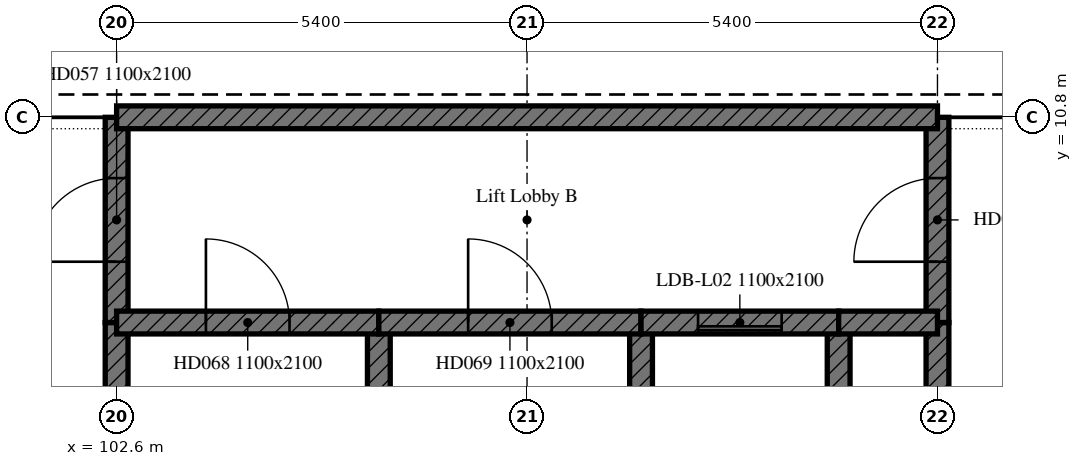
"""IFC4 building model, lengths in metres.
Left out: names, types, materials, properties, quantities, classifications, styles, units other than length and angle.
Written with IfcOpenShell. Run it as: python <this file> out.ifc"""

import sys

from ifc_helpers import new_model, si_unit, direction, frame, frame_2d, origin, place, context, subcontext, project, spatial, rectangle, extrude, element, fill, save


model = new_model("IFC4")
c1 = context("Model", 3, precision=1e-05, world=origin(), true_north=direction((0.0, 1.0)))
c2 = subcontext(c1, "Body", "Model", "MODEL_VIEW")
j1 = project(units=[si_unit("LENGTHUNIT", "METRE"), si_unit("PLANEANGLEUNIT", "RADIAN")], contexts=[c1])
p1 = place(None, origin())
s1 = spatial("IfcSite", under=j1, at=p1, CompositionType="ELEMENT")
p2 = place(p1, origin())
s2 = spatial("IfcBuilding", under=s1, at=p2, CompositionType="ELEMENT")
p3 = place(p2, frame((0.0, 0.0, 14.4)))
s3 = spatial("IfcBuildingStorey", under=s2, at=p3, CompositionType="ELEMENT", Elevation=14.4)
p4 = place(p3, frame((102.6, 5.4, 0.0), z_axis=(0.0, 0.0, 1.0), x_axis=(0.0, 1.0, 0.0)))
e1 = element("IfcWall", 1, at=p4, inside=s3, PredefinedType="SHEAR", context=c2, shape_type="SweptSolid", body=[
    extrude(rectangle(XDim=2.7, YDim=0.3, at=frame_2d((1.35, 0.0))), origin(), (0.0, 0.0, 1.0), 5.1),
])
p5 = place(p3, frame((102.6, 8.1, 0.0), z_axis=(0.0, 0.0, 1.0), x_axis=(0.0, 1.0, 0.0)))
e2 = element("IfcWall", 2, at=p5, inside=s3, PredefinedType="SHEAR", context=c2, shape_type="SweptSolid", body=[
    extrude(rectangle(XDim=2.7, YDim=0.3, at=frame_2d((1.35, 0.0))), origin(), (0.0, 0.0, 1.0), 5.1),
])
p6 = place(p5, frame((0.8, 0.0, 0.0)))
e3 = element("IfcOpeningElement", 3, at=p6, cuts=e2, PredefinedType="OPENING", context=c2, shape_type="SweptSolid", body=[
    extrude(rectangle(XDim=1.1, YDim=2.1, at=frame_2d((0.55, 1.05))), frame((0.0, 0.15, 0.0), z_axis=(0.0, -1.0, 0.0), x_axis=(1.0, 0.0, 0.0)), (0.0, 0.0, 1.0), 0.3),
])
p7 = place(p3, frame((113.4, 5.4, 0.0), z_axis=(0.0, 0.0, 1.0), x_axis=(0.0, 1.0, 0.0)))
e4 = element("IfcWall", 4, at=p7, inside=s3, PredefinedType="SHEAR", context=c2, shape_type="SweptSolid", body=[
    extrude(rectangle(XDim=2.7, YDim=0.3, at=frame_2d((1.35, 0.0))), origin(), (0.0, 0.0, 1.0), 5.1),
])
p8 = place(p3, frame((113.4, 8.1, 0.0), z_axis=(0.0, 0.0, 1.0), x_axis=(0.0, 1.0, 0.0)))
e5 = element("IfcWall", 5, at=p8, inside=s3, PredefinedType="SHEAR", context=c2, shape_type="SweptSolid", body=[
    extrude(rectangle(XDim=2.7, YDim=0.3, at=frame_2d((1.35, 0.0))), origin(), (0.0, 0.0, 1.0), 5.1),
])
p9 = place(p8, frame((0.8, 0.0, 0.0)))
e6 = element("IfcOpeningElement", 6, at=p9, cuts=e5, PredefinedType="OPENING", context=c2, shape_type="SweptSolid", body=[
    extrude(rectangle(XDim=1.1, YDim=2.1, at=frame_2d((0.55, 1.05))), frame((0.0, 0.15, 0.0), z_axis=(0.0, -1.0, 0.0), x_axis=(1.0, 0.0, 0.0)), (0.0, 0.0, 1.0), 0.3),
])
p10 = place(p3, frame((106.05, 0.75, 0.0), z_axis=(0.0, 0.0, 1.0), x_axis=(0.0, 1.0, 0.0)))
e7 = element("IfcWall", 7, at=p10, inside=s3, PredefinedType="SHEAR", context=c2, shape_type="SweptSolid", body=[
    extrude(rectangle(XDim=7.35, YDim=0.3, at=frame_2d((3.675, 0.0))), origin(), (0.0, 0.0, 1.0), 5.1),
])
p11 = place(p3, frame((102.6, 8.1, 0.0), z_axis=(0.0, 0.0, 1.0), x_axis=(1.0, 0.0, 0.0)))
e8 = element("IfcWall", 8, at=p11, inside=s3, PredefinedType="SHEAR", context=c2, shape_type="SweptSolid", body=[
    extrude(rectangle(XDim=3.45, YDim=0.3, at=frame_2d((1.725, 0.0))), origin(), (0.0, 0.0, 1.0), 5.1),
])
p12 = place(p11, frame((1.175, 0.0, 0.0)))
e9 = element("IfcOpeningElement", 9, at=p12, cuts=e8, PredefinedType="OPENING", context=c2, shape_type="SweptSolid", body=[
    extrude(rectangle(XDim=1.1, YDim=2.1, at=frame_2d((0.55, 1.05))), frame((0.0, 0.15, 0.0), z_axis=(0.0, -1.0, 0.0), x_axis=(1.0, 0.0, 0.0)), (0.0, 0.0, 1.0), 0.3),
])
p13 = place(p3, frame((109.5, 4.6, 0.0), z_axis=(0.0, 0.0, 1.0), x_axis=(0.0, 1.0, 0.0)))
e10 = element("IfcWall", 10, at=p13, inside=s3, PredefinedType="SHEAR", context=c2, shape_type="SweptSolid", body=[
    extrude(rectangle(XDim=3.5, YDim=0.3, at=frame_2d((1.75, 0.0))), origin(), (0.0, 0.0, 1.0), 5.1),
])
p14 = place(p3, frame((106.05, 8.1, 0.0), z_axis=(0.0, 0.0, 1.0), x_axis=(1.0, 0.0, 0.0)))
e11 = element("IfcWall", 11, at=p14, inside=s3, PredefinedType="SHEAR", context=c2, shape_type="SweptSolid", body=[
    extrude(rectangle(XDim=3.45, YDim=0.3, at=frame_2d((1.725, 0.0))), origin(), (0.0, 0.0, 1.0), 5.1),
])
p15 = place(p14, frame((1.175, 0.0, 0.0)))
e12 = element("IfcOpeningElement", 12, at=p15, cuts=e11, PredefinedType="OPENING", context=c2, shape_type="SweptSolid", body=[
    extrude(rectangle(XDim=1.1, YDim=2.1, at=frame_2d((0.55, 1.05))), frame((0.0, 0.15, 0.0), z_axis=(0.0, -1.0, 0.0), x_axis=(1.0, 0.0, 0.0)), (0.0, 0.0, 1.0), 0.3),
])
p16 = place(p3, frame((112.1, 4.6, 0.0), z_axis=(0.0, 0.0, 1.0), x_axis=(0.0, 1.0, 0.0)))
e13 = element("IfcWall", 13, at=p16, inside=s3, PredefinedType="SHEAR", context=c2, shape_type="SweptSolid", body=[
    extrude(rectangle(XDim=3.5, YDim=0.3, at=frame_2d((1.75, 0.0))), origin(), (0.0, 0.0, 1.0), 5.1),
])
p17 = place(p3, frame((109.5, 8.1, 0.0), z_axis=(0.0, 0.0, 1.0), x_axis=(1.0, 0.0, 0.0)))
e14 = element("IfcWall", 14, at=p17, inside=s3, PredefinedType="SHEAR", context=c2, shape_type="SweptSolid", body=[
    extrude(rectangle(XDim=2.6, YDim=0.3, at=frame_2d((1.3, 0.0))), origin(), (0.0, 0.0, 1.0), 5.1),
])
p18 = place(p17, frame((0.75, 0.0, 0.0)))
e15 = element("IfcOpeningElement", 15, at=p18, cuts=e14, PredefinedType="OPENING", context=c2, shape_type="SweptSolid", body=[
    extrude(rectangle(XDim=1.1, YDim=2.1, at=frame_2d((0.55, 1.05))), frame((0.0, 0.15, 0.0), z_axis=(0.0, -1.0, 0.0), x_axis=(1.0, 0.0, 0.0)), (0.0, 0.0, 1.0), 0.3),
])
p19 = place(p3, frame((112.1, 8.1, 0.0), z_axis=(0.0, 0.0, 1.0), x_axis=(1.0, 0.0, 0.0)))
e16 = element("IfcWall", 16, at=p19, inside=s3, PredefinedType="SHEAR", context=c2, shape_type="SweptSolid", body=[
    extrude(rectangle(XDim=1.3, YDim=0.3, at=frame_2d((0.65, 0.0))), origin(), (0.0, 0.0, 1.0), 5.1),
])
p20 = place(p3, frame((102.6, 10.8, 0.0), z_axis=(0.0, 0.0, 1.0), x_axis=(1.0, 0.0, 0.0)))
e17 = element("IfcWall", 17, at=p20, inside=s3, PredefinedType="SHEAR", context=c2, shape_type="SweptSolid", body=[
    extrude(rectangle(XDim=10.8, YDim=0.3, at=frame_2d((5.4, 0.0))), origin(), (0.0, 0.0, 1.0), 5.1),
])
p21 = place(p6, origin())
e18 = element("IfcDoor", 18, at=p21, inside=s3, OperationType="SINGLE_SWING_LEFT", PredefinedType="DOOR", context=c2, shape_type="SweptSolid", body=[
    extrude(rectangle(XDim=1.1, YDim=2.1, at=frame_2d((0.55, 1.05))), frame((0.0, 0.025, 0.0), z_axis=(0.0, -1.0, 0.0), x_axis=(1.0, 0.0, 0.0)), (0.0, 0.0, 1.0), 0.05),
])
fill(e3, e18)
p22 = place(p9, origin())
e19 = element("IfcDoor", 19, at=p22, inside=s3, OperationType="SINGLE_SWING_LEFT", PredefinedType="DOOR", context=c2, shape_type="SweptSolid", body=[
    extrude(rectangle(XDim=1.1, YDim=2.1, at=frame_2d((0.55, 1.05))), frame((0.0, 0.025, 0.0), z_axis=(0.0, -1.0, 0.0), x_axis=(1.0, 0.0, 0.0)), (0.0, 0.0, 1.0), 0.05),
])
fill(e6, e19)
p23 = place(p12, origin())
e20 = element("IfcDoor", 20, at=p23, inside=s3, OperationType="SINGLE_SWING_LEFT", PredefinedType="DOOR", context=c2, shape_type="SweptSolid", body=[
    extrude(rectangle(XDim=1.1, YDim=2.1, at=frame_2d((0.55, 1.05))), frame((0.0, 0.025, 0.0), z_axis=(0.0, -1.0, 0.0), x_axis=(1.0, 0.0, 0.0)), (0.0, 0.0, 1.0), 0.05),
])
fill(e9, e20)
p24 = place(p15, origin())
e21 = element("IfcDoor", 21, at=p24, inside=s3, OperationType="SINGLE_SWING_LEFT", PredefinedType="DOOR", context=c2, shape_type="SweptSolid", body=[
    extrude(rectangle(XDim=1.1, YDim=2.1, at=frame_2d((0.55, 1.05))), frame((0.0, 0.025, 0.0), z_axis=(0.0, -1.0, 0.0), x_axis=(1.0, 0.0, 0.0)), (0.0, 0.0, 1.0), 0.05),
])
fill(e12, e21)
p25 = place(p18, origin())
e22 = element("IfcDoor", 22, at=p25, inside=s3, OperationType="SLIDING_TO_LEFT", PredefinedType="DOOR", context=c2, shape_type="SweptSolid", body=[
    extrude(rectangle(XDim=1.1, YDim=2.1, at=frame_2d((0.55, 1.05))), frame((0.0, 0.025, 0.0), z_axis=(0.0, -1.0, 0.0), x_axis=(1.0, 0.0, 0.0)), (0.0, 0.0, 1.0), 0.05),
])
fill(e15, e22)
save(model, sys.argv[1])
